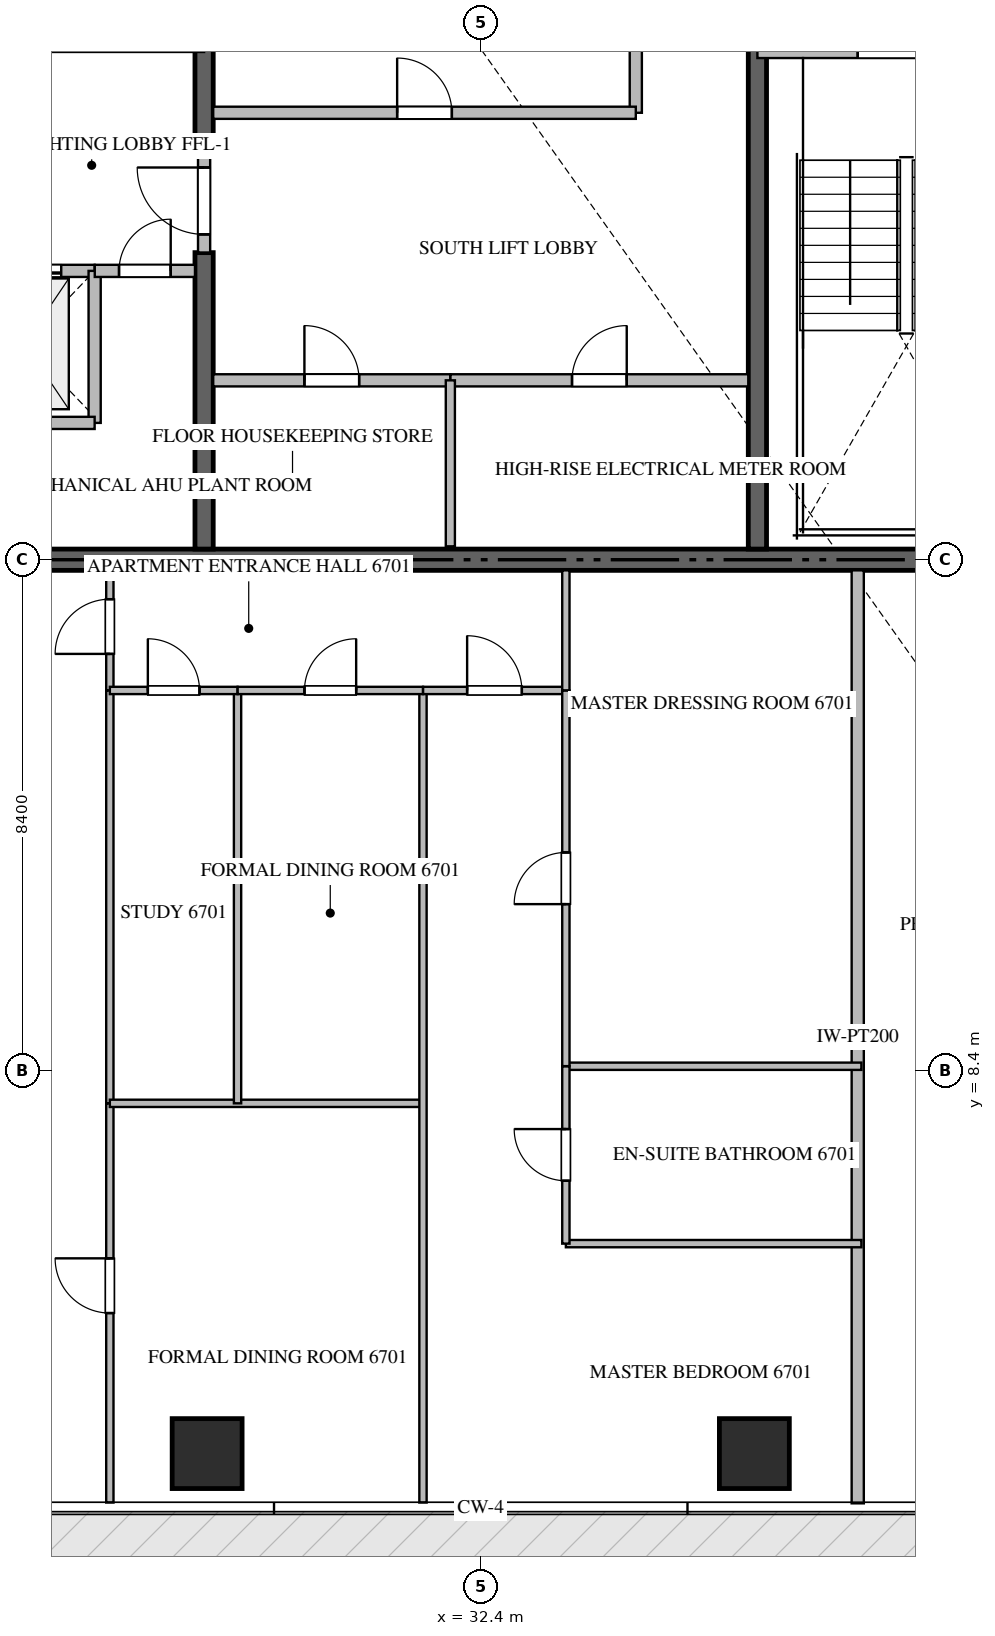
"""IFC4 building model, lengths in metres.
Left out: names, types, materials, properties, quantities, classifications, styles, units other than length and angle.
Written with IfcOpenShell. Run it as: python <this file> out.ifc"""

import sys

from ifc_helpers import new_model, si_unit, direction, frame, frame_2d, origin, origin_2d, place, context, subcontext, project, spatial, rectangle, extrude, source, transform, mapped, element, fill, save


model = new_model("IFC4")
c1 = context("Model", 3, precision=1e-05, world=origin(), true_north=direction((0.0, 1.0)))
c2 = subcontext(c1, "Body", "Model", "MODEL_VIEW")
j1 = project(units=[si_unit("LENGTHUNIT", "METRE"), si_unit("PLANEANGLEUNIT", "RADIAN")], contexts=[c1])
p1 = place(None, origin())
s1 = spatial("IfcSite", under=j1, at=p1, CompositionType="ELEMENT")
p2 = place(p1, origin())
s2 = spatial("IfcBuilding", under=s1, at=p2, CompositionType="ELEMENT")
p3 = place(p2, frame((0.0, 0.0, 268.2)))
s3 = spatial("IfcBuildingStorey", under=s2, at=p3, CompositionType="ELEMENT", Elevation=268.2)
p4 = place(p3, frame((23.4, 16.8, -0.26), z_axis=(0.0, 0.0, 1.0), x_axis=(1.0, 0.0, 0.0)))
e1 = element("IfcWall", 1, at=p4, inside=s3, PredefinedType="SHEAR", context=c2, shape_type="SweptSolid", body=[
    extrude(rectangle(XDim=18.0, YDim=0.35, at=frame_2d((9.0, 0.0))), origin(), (0.0, 0.0, 1.0), 3.848),
])
p5 = place(p3, frame((27.85, 16.975, -0.26), z_axis=(0.0, 0.0, 1.0), x_axis=(0.0, 1.0, 0.0)))
e2 = element("IfcWall", 2, at=p5, inside=s3, PredefinedType="SHEAR", context=c2, shape_type="SweptSolid", body=[
    extrude(rectangle(XDim=4.875, YDim=0.3, at=frame_2d((2.438, 0.0))), origin(), (0.0, 0.0, 1.0), 3.848),
])
p6 = place(p3, frame((27.85, 23.55, -0.26), z_axis=(0.0, 0.0, 1.0), x_axis=(0.0, 1.0, 0.0)))
e3 = element("IfcWall", 3, at=p6, inside=s3, PredefinedType="SHEAR", context=c2, shape_type="SweptSolid", body=[
    extrude(rectangle(XDim=9.875, YDim=0.3, at=frame_2d((4.938, 0.0))), origin(), (0.0, 0.0, 1.0), 3.848),
])
p7 = place(p3, frame((36.95, 16.975, -0.26), z_axis=(0.0, 0.0, 1.0), x_axis=(0.0, 1.0, 0.0)))
e4 = element("IfcWall", 4, at=p7, inside=s3, PredefinedType="SHEAR", context=c2, shape_type="SweptSolid", body=[
    extrude(rectangle(XDim=8.375, YDim=0.3, at=frame_2d((4.188, 0.0))), origin(), (0.0, 0.0, 1.0), 3.848),
])
m1 = source(origin(), c2, "Body", "SweptSolid", [
    extrude(rectangle(XDim=1.15, YDim=1.15, at=origin_2d()), origin(), (0.0, 0.0, 1.0), 3.85),
])
for number, where, z_axis, x_axis in (
    (5, (27.9, 2.1, -0.26), (0.0, 0.0, 1.0), (1.0, 0.0, 0.0)),
    (6, (36.9, 2.1, -0.26), (0.0, 0.0, 1.0), (1.0, 0.0, 0.0)),
):
    element("IfcColumn", number, at=place(p3, frame(where, z_axis=z_axis, x_axis=x_axis)), inside=s3, PredefinedType="COLUMN", context=c2, shape_type="MappedRepresentation", body=[
        mapped(m1, transform((0.0, 0.0, 0.0), scale=1.0)),
    ])
p8 = place(p3, frame((36.95, 25.15, 0.0), z_axis=(0.0, 0.0, 1.0), x_axis=(1.0, 0.0, 0.0)))
e7 = element("IfcWall", 7, at=p8, inside=s3, PredefinedType="STANDARD", context=c2, shape_type="SweptSolid", body=[
    extrude(rectangle(XDim=4.45, YDim=0.2, at=frame_2d((2.225, 0.0))), origin(), (0.0, 0.0, 1.0), 3.59),
])
p9 = place(p8, frame((1.65, 0.0, 0.0)))
e8 = element("IfcOpeningElement", 8, at=p9, cuts=e7, PredefinedType="OPENING", context=c2, shape_type="SweptSolid", body=[
    extrude(rectangle(XDim=1.1, YDim=2.15, at=frame_2d((0.55, 1.075))), frame((0.0, 0.11, 0.0), z_axis=(0.0, -1.0, 0.0), x_axis=(1.0, 0.0, 0.0)), (0.0, 0.0, 1.0), 0.22),
])
p10 = place(p3, frame((23.575, 21.55, 0.0), z_axis=(0.0, 0.0, 1.0), x_axis=(1.0, 0.0, 0.0)))
e9 = element("IfcWall", 9, at=p10, inside=s3, PredefinedType="STANDARD", context=c2, shape_type="SweptSolid", body=[
    extrude(rectangle(XDim=2.475, YDim=0.2, at=frame_2d((1.238, 0.0))), origin(), (0.0, 0.0, 1.0), 3.59),
])
p11 = place(p10, frame((0.725, 0.0, 0.0)))
e10 = element("IfcOpeningElement", 10, at=p11, cuts=e9, PredefinedType="OPENING", context=c2, shape_type="SweptSolid", body=[
    extrude(rectangle(XDim=1.2, YDim=2.2, at=frame_2d((0.6, 1.1))), frame((0.0, 0.11, 0.0), z_axis=(0.0, -1.0, 0.0), x_axis=(1.0, 0.0, 0.0)), (0.0, 0.0, 1.0), 0.22),
])
p12 = place(p3, frame((26.05, 19.05, 0.0), z_axis=(0.0, 0.0, 1.0), x_axis=(0.0, 1.0, 0.0)))
e11 = element("IfcWall", 11, at=p12, inside=s3, PredefinedType="STANDARD", context=c2, shape_type="SweptSolid", body=[
    extrude(rectangle(XDim=2.5, YDim=0.2, at=frame_2d((1.25, 0.0))), origin(), (0.0, 0.0, 1.0), 3.59),
])
p13 = place(p3, frame((23.575, 19.05, 0.0), z_axis=(0.0, 0.0, 1.0), x_axis=(1.0, 0.0, 0.0)))
e12 = element("IfcWall", 12, at=p13, inside=s3, PredefinedType="STANDARD", context=c2, shape_type="SweptSolid", body=[
    extrude(rectangle(XDim=2.475, YDim=0.2, at=frame_2d((1.238, 0.0))), origin(), (0.0, 0.0, 1.0), 3.59),
])
p14 = place(p3, frame((26.052, 21.55, 0.0), z_axis=(0.0, 0.0, 1.0), x_axis=(1.0, 0.0, 0.0)))
e13 = element("IfcWall", 13, at=p14, inside=s3, PredefinedType="STANDARD", context=c2, shape_type="SweptSolid", body=[
    extrude(rectangle(XDim=1.648, YDim=0.2, at=frame_2d((0.824, 0.0))), origin(), (0.0, 0.0, 1.0), 3.59),
])
p15 = place(p14, frame((0.399, 0.0, 0.0)))
e14 = element("IfcOpeningElement", 14, at=p15, cuts=e13, PredefinedType="OPENING", context=c2, shape_type="SweptSolid", body=[
    extrude(rectangle(XDim=0.85, YDim=2.1, at=frame_2d((0.425, 1.05))), frame((0.0, 0.11, 0.0), z_axis=(0.0, -1.0, 0.0), x_axis=(1.0, 0.0, 0.0)), (0.0, 0.0, 1.0), 0.22),
])
p16 = place(p3, frame((27.85, 21.852, 0.0), z_axis=(0.0, 0.0, 1.0), x_axis=(0.0, 1.0, 0.0)))
e15 = element("IfcWall", 15, at=p16, inside=s3, PredefinedType="STANDARD", context=c2, shape_type="SweptSolid", body=[
    extrude(rectangle(XDim=1.696, YDim=0.2, at=frame_2d((0.848, 0.0))), origin(), (0.0, 0.0, 1.0), 3.59),
])
p17 = place(p16, frame((0.298, 0.0, 0.0)))
e16 = element("IfcOpeningElement", 16, at=p17, cuts=e15, PredefinedType="OPENING", context=c2, shape_type="SweptSolid", body=[
    extrude(rectangle(XDim=1.1, YDim=2.15, at=frame_2d((0.55, 1.075))), frame((0.0, 0.11, 0.0), z_axis=(0.0, -1.0, 0.0), x_axis=(1.0, 0.0, 0.0)), (0.0, 0.0, 1.0), 0.22),
])
p18 = place(p3, frame((28.0, 19.75, 0.0), z_axis=(0.0, 0.0, 1.0), x_axis=(1.0, 0.0, 0.0)))
e17 = element("IfcWall", 17, at=p18, inside=s3, PredefinedType="STANDARD", context=c2, shape_type="SweptSolid", body=[
    extrude(rectangle(XDim=3.9, YDim=0.2, at=frame_2d((1.95, 0.0))), origin(), (0.0, 0.0, 1.0), 3.59),
])
p19 = place(p18, frame((1.5, 0.0, 0.0)))
e18 = element("IfcOpeningElement", 18, at=p19, cuts=e17, PredefinedType="OPENING", context=c2, shape_type="SweptSolid", body=[
    extrude(rectangle(XDim=0.9, YDim=2.1, at=frame_2d((0.45, 1.05))), frame((0.0, 0.11, 0.0), z_axis=(0.0, -1.0, 0.0), x_axis=(1.0, 0.0, 0.0)), (0.0, 0.0, 1.0), 0.22),
])
p20 = place(p3, frame((31.902, 19.75, 0.0), z_axis=(0.0, 0.0, 1.0), x_axis=(1.0, 0.0, 0.0)))
e19 = element("IfcWall", 19, at=p20, inside=s3, PredefinedType="STANDARD", context=c2, shape_type="SweptSolid", body=[
    extrude(rectangle(XDim=4.898, YDim=0.2, at=frame_2d((2.449, 0.0))), origin(), (0.0, 0.0, 1.0), 3.59),
])
p21 = place(p20, frame((1.999, 0.0, 0.0)))
e20 = element("IfcOpeningElement", 20, at=p21, cuts=e19, PredefinedType="OPENING", context=c2, shape_type="SweptSolid", body=[
    extrude(rectangle(XDim=0.9, YDim=2.1, at=frame_2d((0.45, 1.05))), frame((0.0, 0.11, 0.0), z_axis=(0.0, -1.0, 0.0), x_axis=(1.0, 0.0, 0.0)), (0.0, 0.0, 1.0), 0.22),
])
p22 = place(p3, frame((31.9, 17.02, 0.0), z_axis=(0.0, 0.0, 1.0), x_axis=(0.0, 1.0, 0.0)))
e21 = element("IfcWall", 21, at=p22, inside=s3, PredefinedType="PARTITIONING", context=c2, shape_type="SweptSolid", body=[
    extrude(rectangle(XDim=2.73, YDim=0.15, at=frame_2d((1.365, 0.0))), origin(), (0.0, 0.0, 1.0), 3.59),
])
p23 = place(p3, frame((34.95, 24.15, 0.0), z_axis=(0.0, 0.0, 1.0), x_axis=(0.0, 1.0, 0.0)))
e22 = element("IfcWall", 22, at=p23, inside=s3, PredefinedType="STANDARD", context=c2, shape_type="SweptSolid", body=[
    extrude(rectangle(XDim=2.8, YDim=0.2, at=frame_2d((1.4, 0.0))), origin(), (0.0, 0.0, 1.0), 3.59),
])
p24 = place(p3, frame((28.0, 24.15, 0.0), z_axis=(0.0, 0.0, 1.0), x_axis=(1.0, 0.0, 0.0)))
e23 = element("IfcWall", 23, at=p24, inside=s3, PredefinedType="STANDARD", context=c2, shape_type="SweptSolid", body=[
    extrude(rectangle(XDim=6.95, YDim=0.2, at=frame_2d((3.475, 0.0))), origin(), (0.0, 0.0, 1.0), 3.59),
])
p25 = place(p24, frame((3.025, 0.0, 0.0)))
e24 = element("IfcOpeningElement", 24, at=p25, cuts=e23, PredefinedType="OPENING", context=c2, shape_type="SweptSolid", body=[
    extrude(rectangle(XDim=0.9, YDim=2.1, at=frame_2d((0.45, 1.05))), frame((0.0, 0.11, 0.0), z_axis=(0.0, -1.0, 0.0), x_axis=(1.0, 0.0, 0.0)), (0.0, 0.0, 1.0), 0.22),
])
p26 = place(p3, frame((38.6, 1.282, 0.0), z_axis=(0.0, 0.0, 1.0), x_axis=(0.0, 1.0, 0.0)))
e25 = element("IfcWall", 25, at=p26, inside=s3, PredefinedType="PARTITIONING", context=c2, shape_type="SweptSolid", body=[
    extrude(rectangle(XDim=15.343, YDim=0.2, at=frame_2d((7.671, 0.0))), origin(), (0.0, 0.0, 1.0), 3.59),
])
p27 = place(p3, frame((26.3, 14.65, 0.0), z_axis=(0.0, 0.0, 1.0), x_axis=(0.0, 1.0, 0.0)))
e26 = element("IfcWall", 26, at=p27, inside=s3, PredefinedType="PARTITIONING", context=c2, shape_type="SweptSolid", body=[
    extrude(rectangle(XDim=1.975, YDim=0.12, at=frame_2d((0.988, 0.0))), origin(), (0.0, 0.0, 1.0), 3.59),
])
p28 = place(p27, frame((0.601, 0.0, 0.0)))
e27 = element("IfcOpeningElement", 27, at=p28, cuts=e26, PredefinedType="OPENING", context=c2, shape_type="SweptSolid", body=[
    extrude(rectangle(XDim=0.9, YDim=2.1, at=frame_2d((0.45, 1.05))), frame((0.0, 0.07, 0.0), z_axis=(0.0, -1.0, 0.0), x_axis=(1.0, 0.0, 0.0)), (0.0, 0.0, 1.0), 0.14),
])
p29 = place(p3, frame((26.3, 1.295, 0.0), z_axis=(0.0, 0.0, 1.0), x_axis=(0.0, 1.0, 0.0)))
e28 = element("IfcWall", 28, at=p29, inside=s3, PredefinedType="PARTITIONING", context=c2, shape_type="SweptSolid", body=[
    extrude(rectangle(XDim=6.565, YDim=0.12, at=frame_2d((3.283, 0.0))), origin(), (0.0, 0.0, 1.0), 3.59),
])
p30 = place(p29, frame((3.116, 0.0, 0.0)))
e29 = element("IfcOpeningElement", 29, at=p30, cuts=e28, PredefinedType="OPENING", context=c2, shape_type="SweptSolid", body=[
    extrude(rectangle(XDim=0.9, YDim=2.1, at=frame_2d((0.45, 1.05))), frame((0.0, 0.07, 0.0), z_axis=(0.0, -1.0, 0.0), x_axis=(1.0, 0.0, 0.0)), (0.0, 0.0, 1.0), 0.14),
])
p31 = place(p3, frame((26.3, 7.862, 0.0), z_axis=(0.0, 0.0, 1.0), x_axis=(0.0, 1.0, 0.0)))
e30 = element("IfcWall", 30, at=p31, inside=s3, PredefinedType="PARTITIONING", context=c2, shape_type="SweptSolid", body=[
    extrude(rectangle(XDim=6.786, YDim=0.12, at=frame_2d((3.393, 0.0))), origin(), (0.0, 0.0, 1.0), 3.59),
])
p32 = place(p3, frame((26.3, 7.86, 0.0), z_axis=(0.0, 0.0, 1.0), x_axis=(1.0, 0.0, 0.0)))
e31 = element("IfcWall", 31, at=p32, inside=s3, PredefinedType="PARTITIONING", context=c2, shape_type="SweptSolid", body=[
    extrude(rectangle(XDim=5.15, YDim=0.12, at=frame_2d((2.575, 0.0))), origin(), (0.0, 0.0, 1.0), 3.59),
])
p33 = place(p3, frame((31.45, 1.295, 0.0), z_axis=(0.0, 0.0, 1.0), x_axis=(0.0, 1.0, 0.0)))
e32 = element("IfcWall", 32, at=p33, inside=s3, PredefinedType="PARTITIONING", context=c2, shape_type="SweptSolid", body=[
    extrude(rectangle(XDim=13.355, YDim=0.12, at=frame_2d((6.677, 0.0))), origin(), (0.0, 0.0, 1.0), 3.59),
])
p34 = place(p3, frame((28.4, 7.86, 0.0), z_axis=(0.0, 0.0, 1.0), x_axis=(0.0, 1.0, 0.0)))
e33 = element("IfcWall", 33, at=p34, inside=s3, PredefinedType="PARTITIONING", context=c2, shape_type="SweptSolid", body=[
    extrude(rectangle(XDim=6.79, YDim=0.12, at=frame_2d((3.395, 0.0))), origin(), (0.0, 0.0, 1.0), 3.59),
])
p35 = place(p3, frame((26.3, 14.65, 0.0), z_axis=(0.0, 0.0, 1.0), x_axis=(1.0, 0.0, 0.0)))
e34 = element("IfcWall", 34, at=p35, inside=s3, PredefinedType="PARTITIONING", context=c2, shape_type="SweptSolid", body=[
    extrude(rectangle(XDim=2.1, YDim=0.12, at=frame_2d((1.05, 0.0))), origin(), (0.0, 0.0, 1.0), 3.59),
])
p36 = place(p35, frame((0.625, 0.0, 0.0)))
e35 = element("IfcOpeningElement", 35, at=p36, cuts=e34, PredefinedType="OPENING", context=c2, shape_type="SweptSolid", body=[
    extrude(rectangle(XDim=0.85, YDim=2.1, at=frame_2d((0.425, 1.05))), frame((0.0, 0.07, 0.0), z_axis=(0.0, -1.0, 0.0), x_axis=(1.0, 0.0, 0.0)), (0.0, 0.0, 1.0), 0.14),
])
p37 = place(p3, frame((28.402, 14.65, 0.0), z_axis=(0.0, 0.0, 1.0), x_axis=(1.0, 0.0, 0.0)))
e36 = element("IfcWall", 36, at=p37, inside=s3, PredefinedType="PARTITIONING", context=c2, shape_type="SweptSolid", body=[
    extrude(rectangle(XDim=3.048, YDim=0.12, at=frame_2d((1.524, 0.0))), origin(), (0.0, 0.0, 1.0), 3.59),
])
p38 = place(p37, frame((1.099, 0.0, 0.0)))
e37 = element("IfcOpeningElement", 37, at=p38, cuts=e36, PredefinedType="OPENING", context=c2, shape_type="SweptSolid", body=[
    extrude(rectangle(XDim=0.85, YDim=2.1, at=frame_2d((0.425, 1.05))), frame((0.0, 0.07, 0.0), z_axis=(0.0, -1.0, 0.0), x_axis=(1.0, 0.0, 0.0)), (0.0, 0.0, 1.0), 0.14),
])
p39 = place(p3, frame((31.452, 14.65, 0.0), z_axis=(0.0, 0.0, 1.0), x_axis=(1.0, 0.0, 0.0)))
e38 = element("IfcWall", 38, at=p39, inside=s3, PredefinedType="PARTITIONING", context=c2, shape_type="SweptSolid", body=[
    extrude(rectangle(XDim=2.348, YDim=0.12, at=frame_2d((1.174, 0.0))), origin(), (0.0, 0.0, 1.0), 3.59),
])
p40 = place(p39, frame((0.724, 0.0, 0.0)))
e39 = element("IfcOpeningElement", 39, at=p40, cuts=e38, PredefinedType="OPENING", context=c2, shape_type="SweptSolid", body=[
    extrude(rectangle(XDim=0.9, YDim=2.1, at=frame_2d((0.45, 1.05))), frame((0.0, 0.07, 0.0), z_axis=(0.0, -1.0, 0.0), x_axis=(1.0, 0.0, 0.0)), (0.0, 0.0, 1.0), 0.14),
])
for number, where, z_axis, x_axis in (
    (40, (33.8, 5.553, 0.0), (0.0, 0.0, 1.0), (1.0, 0.0, 0.0)),
    (41, (33.8, 8.47, 0.0), (0.0, 0.0, 1.0), (1.0, 0.0, 0.0)),
):
    element("IfcWall", number, at=place(p3, frame(where, z_axis=z_axis, x_axis=x_axis)), inside=s3, PredefinedType="PARTITIONING", context=c2, shape_type="SweptSolid", body=[
        extrude(rectangle(XDim=4.86, YDim=0.12, at=frame_2d((2.43, 0.0))), origin(), (0.0, 0.0, 1.0), 3.59),
    ])
p41 = place(p3, frame((33.8, 5.553, 0.0), z_axis=(0.0, 0.0, 1.0), x_axis=(0.0, 1.0, 0.0)))
e42 = element("IfcWall", 42, at=p41, inside=s3, PredefinedType="PARTITIONING", context=c2, shape_type="SweptSolid", body=[
    extrude(rectangle(XDim=2.917, YDim=0.12, at=frame_2d((1.458, 0.0))), origin(), (0.0, 0.0, 1.0), 3.59),
])
p42 = place(p41, frame((1.034, 0.0, 0.0)))
e43 = element("IfcOpeningElement", 43, at=p42, cuts=e42, PredefinedType="OPENING", context=c2, shape_type="SweptSolid", body=[
    extrude(rectangle(XDim=0.85, YDim=2.1, at=frame_2d((0.425, 1.05))), frame((0.0, 0.07, 0.0), z_axis=(0.0, -1.0, 0.0), x_axis=(1.0, 0.0, 0.0)), (0.0, 0.0, 1.0), 0.14),
])
p43 = place(p3, frame((33.8, 8.472, 0.0), z_axis=(0.0, 0.0, 1.0), x_axis=(0.0, 1.0, 0.0)))
e44 = element("IfcWall", 44, at=p43, inside=s3, PredefinedType="PARTITIONING", context=c2, shape_type="SweptSolid", body=[
    extrude(rectangle(XDim=6.178, YDim=0.12, at=frame_2d((3.089, 0.0))), origin(), (0.0, 0.0, 1.0), 3.59),
])
p44 = place(p43, frame((2.664, 0.0, 0.0)))
e45 = element("IfcOpeningElement", 45, at=p44, cuts=e44, PredefinedType="OPENING", context=c2, shape_type="SweptSolid", body=[
    extrude(rectangle(XDim=0.85, YDim=2.1, at=frame_2d((0.425, 1.05))), frame((0.0, 0.07, 0.0), z_axis=(0.0, -1.0, 0.0), x_axis=(1.0, 0.0, 0.0)), (0.0, 0.0, 1.0), 0.14),
])
p45 = place(p3, frame((33.8, 14.652, 0.0), z_axis=(0.0, 0.0, 1.0), x_axis=(0.0, 1.0, 0.0)))
e46 = element("IfcWall", 46, at=p45, inside=s3, PredefinedType="PARTITIONING", context=c2, shape_type="SweptSolid", body=[
    extrude(rectangle(XDim=1.973, YDim=0.12, at=frame_2d((0.986, 0.0))), origin(), (0.0, 0.0, 1.0), 3.59),
])
m2 = source(origin(), c2, "Body", "SweptSolid", [
    extrude(rectangle(XDim=1.1, YDim=2.15, at=frame_2d((0.55, 1.075))), frame((0.0, 0.025, 0.0), z_axis=(0.0, -1.0, 0.0), x_axis=(1.0, 0.0, 0.0)), (0.0, 0.0, 1.0), 0.05),
])
p46 = place(p9, origin())
e47 = element("IfcDoor", 47, at=p46, inside=s3, OperationType="SINGLE_SWING_RIGHT", PredefinedType="DOOR", context=c2, shape_type="MappedRepresentation", body=[
    mapped(m2, transform((0.0, 0.0, 0.0), scale=1.0)),
])
fill(e8, e47)
m3 = source(origin(), c2, "Body", "SweptSolid", [
    extrude(rectangle(XDim=1.2, YDim=2.2, at=frame_2d((0.6, 1.1))), frame((0.0, 0.025, 0.0), z_axis=(0.0, -1.0, 0.0), x_axis=(1.0, 0.0, 0.0)), (0.0, 0.0, 1.0), 0.05),
])
p47 = place(p11, origin())
e48 = element("IfcDoor", 48, at=p47, inside=s3, OperationType="DOUBLE_DOOR_SLIDING", PredefinedType="DOOR", context=c2, shape_type="MappedRepresentation", body=[
    mapped(m3, transform((0.0, 0.0, 0.0), scale=1.0)),
])
fill(e10, e48)
m4 = source(origin(), c2, "Body", "SweptSolid", [
    extrude(rectangle(XDim=0.85, YDim=2.1, at=frame_2d((0.425, 1.05))), frame((0.0, 0.025, 0.0), z_axis=(0.0, -1.0, 0.0), x_axis=(1.0, 0.0, 0.0)), (0.0, 0.0, 1.0), 0.05),
])
p48 = place(p15, origin())
e49 = element("IfcDoor", 49, at=p48, inside=s3, OperationType="SINGLE_SWING_RIGHT", PredefinedType="DOOR", context=c2, shape_type="MappedRepresentation", body=[
    mapped(m4, transform((0.0, 0.0, 0.0), scale=1.0)),
])
fill(e14, e49)
p49 = place(p17, origin())
e50 = element("IfcDoor", 50, at=p49, inside=s3, OperationType="SINGLE_SWING_RIGHT", PredefinedType="DOOR", context=c2, shape_type="MappedRepresentation", body=[
    mapped(m2, transform((0.0, 0.0, 0.0), scale=1.0)),
])
fill(e16, e50)
m5 = source(origin(), c2, "Body", "SweptSolid", [
    extrude(rectangle(XDim=0.9, YDim=2.1, at=frame_2d((0.45, 1.05))), frame((0.0, 0.025, 0.0), z_axis=(0.0, -1.0, 0.0), x_axis=(1.0, 0.0, 0.0)), (0.0, 0.0, 1.0), 0.05),
])
p50 = place(p19, origin())
e51 = element("IfcDoor", 51, at=p50, inside=s3, OperationType="SINGLE_SWING_LEFT", PredefinedType="DOOR", context=c2, shape_type="MappedRepresentation", body=[
    mapped(m5, transform((0.0, 0.0, 0.0), scale=1.0)),
])
fill(e18, e51)
p51 = place(p21, origin())
e52 = element("IfcDoor", 52, at=p51, inside=s3, OperationType="SINGLE_SWING_RIGHT", PredefinedType="DOOR", context=c2, shape_type="MappedRepresentation", body=[
    mapped(m5, transform((0.0, 0.0, 0.0), scale=1.0)),
])
fill(e20, e52)
p52 = place(p25, origin())
e53 = element("IfcDoor", 53, at=p52, inside=s3, OperationType="SINGLE_SWING_LEFT", PredefinedType="DOOR", context=c2, shape_type="MappedRepresentation", body=[
    mapped(m5, transform((0.0, 0.0, 0.0), scale=1.0)),
])
fill(e24, e53)
p53 = place(p28, origin())
e54 = element("IfcDoor", 54, at=p53, inside=s3, OperationType="SINGLE_SWING_LEFT", PredefinedType="DOOR", context=c2, shape_type="MappedRepresentation", body=[
    mapped(m5, transform((0.0, 0.0, 0.0), scale=1.0)),
])
fill(e27, e54)
p54 = place(p30, origin())
e55 = element("IfcDoor", 55, at=p54, inside=s3, OperationType="SINGLE_SWING_RIGHT", PredefinedType="DOOR", context=c2, shape_type="MappedRepresentation", body=[
    mapped(m5, transform((0.0, 0.0, 0.0), scale=1.0)),
])
fill(e29, e55)
p55 = place(p36, origin())
e56 = element("IfcDoor", 56, at=p55, inside=s3, OperationType="SINGLE_SWING_LEFT", PredefinedType="DOOR", context=c2, shape_type="MappedRepresentation", body=[
    mapped(m4, transform((0.0, 0.0, 0.0), scale=1.0)),
])
fill(e35, e56)
p56 = place(p38, origin())
e57 = element("IfcDoor", 57, at=p56, inside=s3, OperationType="SINGLE_SWING_RIGHT", PredefinedType="DOOR", context=c2, shape_type="MappedRepresentation", body=[
    mapped(m4, transform((0.0, 0.0, 0.0), scale=1.0)),
])
fill(e37, e57)
p57 = place(p40, origin())
e58 = element("IfcDoor", 58, at=p57, inside=s3, OperationType="SINGLE_SWING_LEFT", PredefinedType="DOOR", context=c2, shape_type="MappedRepresentation", body=[
    mapped(m5, transform((0.0, 0.0, 0.0), scale=1.0)),
])
fill(e39, e58)
p58 = place(p42, origin())
e59 = element("IfcDoor", 59, at=p58, inside=s3, OperationType="SINGLE_SWING_RIGHT", PredefinedType="DOOR", context=c2, shape_type="MappedRepresentation", body=[
    mapped(m4, transform((0.0, 0.0, 0.0), scale=1.0)),
])
fill(e43, e59)
p59 = place(p44, origin())
e60 = element("IfcDoor", 60, at=p59, inside=s3, OperationType="SINGLE_SWING_LEFT", PredefinedType="DOOR", context=c2, shape_type="MappedRepresentation", body=[
    mapped(m4, transform((0.0, 0.0, 0.0), scale=1.0)),
])
fill(e45, e60)
save(model, sys.argv[1])
